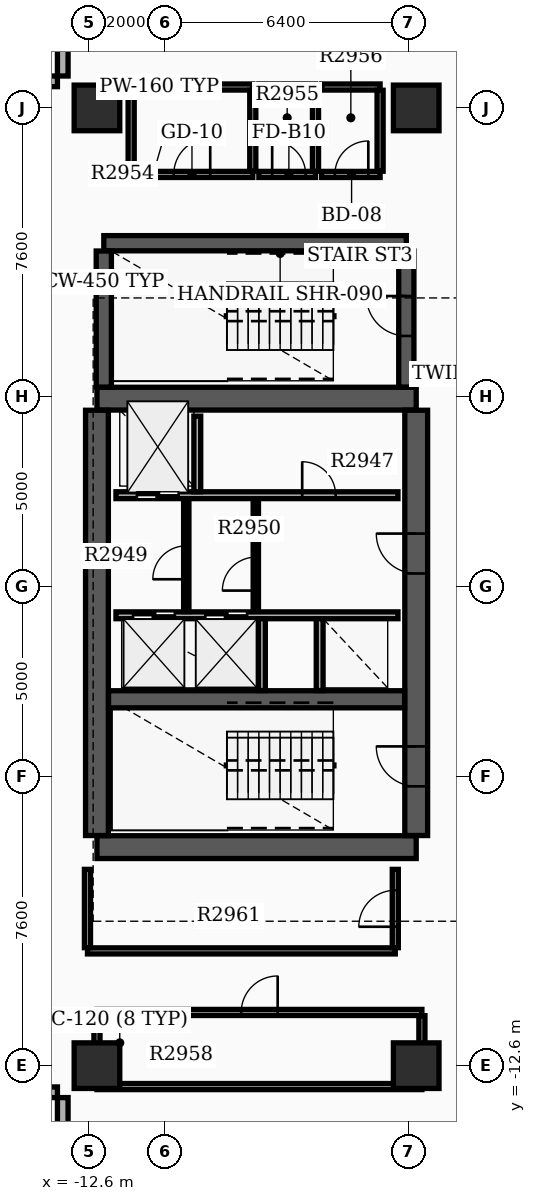
"""IFC4 building model, lengths in metres.
Left out: names, types, materials, properties, quantities, classifications, styles, units other than length and angle.
Written with IfcOpenShell. Run it as: python <this file> out.ifc"""

import sys

from ifc_helpers import new_model, si_unit, direction, frame, frame_2d, origin, origin_2d, place, context, subcontext, project, spatial, rectangle, extrude, element, fill, save


model = new_model("IFC4")
c1 = context("Model", 3, precision=1e-05, world=origin(), true_north=direction((0.0, 1.0)))
c2 = subcontext(c1, "Body", "Model", "MODEL_VIEW")
j1 = project(units=[si_unit("LENGTHUNIT", "METRE"), si_unit("PLANEANGLEUNIT", "RADIAN")], contexts=[c1])
p1 = place(None, origin())
s1 = spatial("IfcSite", under=j1, at=p1, CompositionType="ELEMENT")
p2 = place(p1, origin())
s2 = spatial("IfcBuilding", under=s1, at=p2, CompositionType="ELEMENT")
p3 = place(p2, frame((0.0, 0.0, 183.9)))
s3 = spatial("IfcBuildingStorey", under=s2, at=p3, CompositionType="ELEMENT", Elevation=183.9)
for number, where, z_axis, x_axis in (
    (1, (-12.4, -6.85, 0.0), (0.0, 0.0, 1.0), (1.0, 0.0, 0.0)),
    (2, (-12.4, 4.95, 0.0), (0.0, 0.0, 1.0), (1.0, 0.0, 0.0)),
):
    element("IfcWall", number, at=place(p3, frame(where, z_axis=z_axis, x_axis=x_axis)), inside=s3, PredefinedType="SHEAR", context=c2, shape_type="SweptSolid", body=[
        extrude(rectangle(XDim=8.4, YDim=0.6, at=frame_2d((4.2, 0.0))), origin(), (0.0, 0.0, 1.0), 3.7),
    ])
p4 = place(p3, frame((-12.4, -6.545, 0.0), z_axis=(0.0, 0.0, 1.0), x_axis=(0.0, 1.0, 0.0)))
e3 = element("IfcWall", 3, at=p4, inside=s3, PredefinedType="SHEAR", context=c2, shape_type="SweptSolid", body=[
    extrude(rectangle(XDim=11.19, YDim=0.6, at=frame_2d((5.595, 0.0))), origin(), (0.0, 0.0, 1.0), 3.7),
])
p5 = place(p3, frame((-4.0, -6.545, 0.0), z_axis=(0.0, 0.0, 1.0), x_axis=(0.0, 1.0, 0.0)))
e4 = element("IfcWall", 4, at=p5, inside=s3, PredefinedType="SHEAR", context=c2, shape_type="SweptSolid", body=[
    extrude(rectangle(XDim=11.19, YDim=0.6, at=frame_2d((5.595, 0.0))), origin(), (0.0, 0.0, 1.0), 3.7),
])
p6 = place(p5, frame((1.295, 0.0, 0.0)))
e5 = element("IfcOpeningElement", 5, at=p6, cuts=e4, PredefinedType="OPENING", context=c2, shape_type="SweptSolid", body=[
    extrude(rectangle(XDim=1.05, YDim=2.15, at=frame_2d((0.525, 1.075))), frame((0.0, 0.31, 0.0), z_axis=(0.0, -1.0, 0.0), x_axis=(1.0, 0.0, 0.0)), (0.0, 0.0, 1.0), 0.62),
])
p7 = place(p5, frame((6.895, 0.0, 0.0)))
e6 = element("IfcOpeningElement", 6, at=p7, cuts=e4, PredefinedType="OPENING", context=c2, shape_type="SweptSolid", body=[
    extrude(rectangle(XDim=1.05, YDim=2.15, at=frame_2d((0.525, 1.075))), frame((0.0, 0.31, 0.0), z_axis=(0.0, -1.0, 0.0), x_axis=(1.0, 0.0, 0.0)), (0.0, 0.0, 1.0), 0.62),
])
p8 = place(p3, frame((-12.095, -2.96, 0.0), z_axis=(0.0, 0.0, 1.0), x_axis=(1.0, 0.0, 0.0)))
e7 = element("IfcWall", 7, at=p8, inside=s3, PredefinedType="SHEAR", context=c2, shape_type="SweptSolid", body=[
    extrude(rectangle(XDim=7.79, YDim=0.45, at=frame_2d((3.895, 0.0))), origin(), (0.0, 0.0, 1.0), 3.7),
])
p9 = place(p3, frame((-12.22, 9.04, 0.0), z_axis=(0.0, 0.0, 1.0), x_axis=(1.0, 0.0, 0.0)))
e8 = element("IfcWall", 8, at=p9, inside=s3, PredefinedType="SHEAR", context=c2, shape_type="SweptSolid", body=[
    extrude(rectangle(XDim=7.96, YDim=0.4, at=frame_2d((3.98, 0.0))), origin(), (0.0, 0.0, 1.0), 3.7),
])
p10 = place(p3, frame((-12.22, 5.255, 0.0), z_axis=(0.0, 0.0, 1.0), x_axis=(0.0, 1.0, 0.0)))
e9 = element("IfcWall", 9, at=p10, inside=s3, PredefinedType="SHEAR", context=c2, shape_type="SweptSolid", body=[
    extrude(rectangle(XDim=3.58, YDim=0.4, at=frame_2d((1.79, 0.0))), origin(), (0.0, 0.0, 1.0), 3.7),
])
p11 = place(p3, frame((-4.26, 5.255, 0.0), z_axis=(0.0, 0.0, 1.0), x_axis=(0.0, 1.0, 0.0)))
e10 = element("IfcWall", 10, at=p11, inside=s3, PredefinedType="SHEAR", context=c2, shape_type="SweptSolid", body=[
    extrude(rectangle(XDim=3.58, YDim=0.4, at=frame_2d((1.79, 0.0))), origin(), (0.0, 0.0, 1.0), 3.7),
])
p12 = place(p11, frame((1.345, 0.0, 0.0)))
e11 = element("IfcOpeningElement", 11, at=p12, cuts=e10, PredefinedType="OPENING", context=c2, shape_type="SweptSolid", body=[
    extrude(rectangle(XDim=1.05, YDim=2.15, at=frame_2d((0.525, 1.075))), frame((0.0, 0.21, 0.0), z_axis=(0.0, -1.0, 0.0), x_axis=(1.0, 0.0, 0.0)), (0.0, 0.0, 1.0), 0.42),
])
for number, where, z_axis, x_axis in (
    (12, (-12.4, -12.6, 0.0), (0.0, 0.0, 1.0), (1.0, 0.0, 0.0)),
    (13, (-12.4, 12.6, 0.0), (0.0, 0.0, 1.0), (1.0, 0.0, 0.0)),
    (14, (-4.0, -12.6, 0.0), (0.0, 0.0, 1.0), (1.0, 0.0, 0.0)),
    (15, (-4.0, 12.6, 0.0), (0.0, 0.0, 1.0), (1.0, 0.0, 0.0)),
):
    element("IfcColumn", number, at=place(p3, frame(where, z_axis=z_axis, x_axis=x_axis)), inside=s3, PredefinedType="COLUMN", context=c2, shape_type="SweptSolid", body=[
        extrude(rectangle(XDim=1.2, YDim=1.2, at=origin_2d()), origin(), (0.0, 0.0, 1.0), 3.9),
    ])
p13 = place(p3, frame((-14.66, 13.3, 0.0), z_axis=(0.0, 0.0, 1.0), x_axis=(1.0, 0.0, 0.0)))
e16 = element("IfcWall", 16, at=p13, inside=s3, PredefinedType="STANDARD", context=c2, shape_type="SweptSolid", body=[
    extrude(rectangle(XDim=1.22, YDim=0.28, at=frame_2d((0.61, 0.0))), origin(), (0.0, 0.0, 1.0), 2.97),
])
p14 = place(p3, frame((-13.3, 13.44, 0.0), z_axis=(0.0, 0.0, 1.0), x_axis=(0.0, 1.0, 0.0)))
e17 = element("IfcWall", 17, at=p14, inside=s3, PredefinedType="STANDARD", context=c2, shape_type="SweptSolid", body=[
    extrude(rectangle(XDim=1.5, YDim=0.28, at=frame_2d((0.75, 0.0))), origin(), (0.0, 0.0, 1.0), 2.97),
])
p15 = place(p3, frame((-14.66, -13.3, 0.0), z_axis=(0.0, 0.0, 1.0), x_axis=(1.0, 0.0, 0.0)))
e18 = element("IfcWall", 18, at=p15, inside=s3, PredefinedType="STANDARD", context=c2, shape_type="SweptSolid", body=[
    extrude(rectangle(XDim=1.22, YDim=0.28, at=frame_2d((0.61, 0.0))), origin(), (0.0, 0.0, 1.0), 2.97),
])
p16 = place(p3, frame((-13.3, -13.44, 0.0), z_axis=(0.0, 0.0, 1.0), x_axis=(0.0, -1.0, 0.0)))
e19 = element("IfcWall", 19, at=p16, inside=s3, PredefinedType="STANDARD", context=c2, shape_type="SweptSolid", body=[
    extrude(rectangle(XDim=1.5, YDim=0.28, at=frame_2d((0.75, 0.0))), origin(), (0.0, 0.0, 1.0), 2.97),
])
p17 = place(p3, frame((-11.9, 2.41, 0.0), z_axis=(0.0, 0.0, 1.0), x_axis=(1.0, 0.0, 0.0)))
e20 = element("IfcWall", 20, at=p17, inside=s3, PredefinedType="SOLIDWALL", context=c2, shape_type="SweptSolid", body=[
    extrude(rectangle(XDim=7.42, YDim=0.18, at=frame_2d((3.71, 0.0))), origin(), (0.0, 0.0, 1.0), 2.96),
])
p18 = place(p17, frame((0.55, 0.0, 0.0)))
e21 = element("IfcOpeningElement", 21, at=p18, cuts=e20, PredefinedType="OPENING", context=c2, shape_type="SweptSolid", body=[
    extrude(rectangle(XDim=1.1, YDim=2.15, at=frame_2d((0.55, 1.075))), frame((0.0, 0.1, 0.0), z_axis=(0.0, -1.0, 0.0), x_axis=(1.0, 0.0, 0.0)), (0.0, 0.0, 1.0), 0.2),
])
p19 = place(p17, frame((4.9, 0.0, 0.0)))
e22 = element("IfcOpeningElement", 22, at=p19, cuts=e20, PredefinedType="OPENING", context=c2, shape_type="SweptSolid", body=[
    extrude(rectangle(XDim=0.88, YDim=2.1, at=frame_2d((0.44, 1.05))), frame((0.0, 0.1, 0.0), z_axis=(0.0, -1.0, 0.0), x_axis=(1.0, 0.0, 0.0)), (0.0, 0.0, 1.0), 0.2),
])
p20 = place(p3, frame((-11.9, -0.75, 0.0), z_axis=(0.0, 0.0, 1.0), x_axis=(1.0, 0.0, 0.0)))
e23 = element("IfcWall", 23, at=p20, inside=s3, PredefinedType="SOLIDWALL", context=c2, shape_type="SweptSolid", body=[
    extrude(rectangle(XDim=7.42, YDim=0.18, at=frame_2d((3.71, 0.0))), origin(), (0.0, 0.0, 1.0), 2.96),
])
p21 = place(p20, frame((0.45, 0.0, 0.0)))
e24 = element("IfcOpeningElement", 24, at=p21, cuts=e23, PredefinedType="OPENING", context=c2, shape_type="SweptSolid", body=[
    extrude(rectangle(XDim=1.1, YDim=2.15, at=frame_2d((0.55, 1.075))), frame((0.0, 0.1, 0.0), z_axis=(0.0, -1.0, 0.0), x_axis=(1.0, 0.0, 0.0)), (0.0, 0.0, 1.0), 0.2),
])
p22 = place(p20, frame((2.35, 0.0, 0.0)))
e25 = element("IfcOpeningElement", 25, at=p22, cuts=e23, PredefinedType="OPENING", context=c2, shape_type="SweptSolid", body=[
    extrude(rectangle(XDim=1.1, YDim=2.15, at=frame_2d((0.55, 1.075))), frame((0.0, 0.1, 0.0), z_axis=(0.0, -1.0, 0.0), x_axis=(1.0, 0.0, 0.0)), (0.0, 0.0, 1.0), 0.2),
])
p23 = place(p3, frame((-9.76, 2.5, 0.0), z_axis=(0.0, 0.0, 1.0), x_axis=(0.0, 1.0, 0.0)))
e26 = element("IfcWall", 26, at=p23, inside=s3, PredefinedType="SOLIDWALL", context=c2, shape_type="SweptSolid", body=[
    extrude(rectangle(XDim=1.99, YDim=0.18, at=frame_2d((0.995, 0.0))), origin(), (0.0, 0.0, 1.0), 2.96),
])
for number, where, z_axis, x_axis in (
    (27, (-8.06, -2.73, 0.0), (0.0, 0.0, 1.0), (0.0, 1.0, 0.0)),
    (28, (-6.54, -2.73, 0.0), (0.0, 0.0, 1.0), (0.0, 1.0, 0.0)),
):
    element("IfcWall", number, at=place(p3, frame(where, z_axis=z_axis, x_axis=x_axis)), inside=s3, PredefinedType="SOLIDWALL", context=c2, shape_type="SweptSolid", body=[
        extrude(rectangle(XDim=1.89, YDim=0.18, at=frame_2d((0.945, 0.0))), origin(), (0.0, 0.0, 1.0), 2.96),
    ])
p24 = place(p3, frame((-8.22, -0.65, 0.0), z_axis=(0.0, 0.0, 1.0), x_axis=(0.0, 1.0, 0.0)))
e29 = element("IfcWall", 29, at=p24, inside=s3, PredefinedType="SOLIDWALL", context=c2, shape_type="SweptSolid", body=[
    extrude(rectangle(XDim=2.96, YDim=0.14, at=frame_2d((1.48, 0.0))), origin(), (0.0, 0.0, 1.0), 2.96),
])
p25 = place(p24, frame((0.55, 0.0, 0.0)))
e30 = element("IfcOpeningElement", 30, at=p25, cuts=e29, PredefinedType="OPENING", context=c2, shape_type="SweptSolid", body=[
    extrude(rectangle(XDim=0.88, YDim=2.1, at=frame_2d((0.44, 1.05))), frame((0.0, 0.08, 0.0), z_axis=(0.0, -1.0, 0.0), x_axis=(1.0, 0.0, 0.0)), (0.0, 0.0, 1.0), 0.16),
])
p26 = place(p3, frame((-10.05, -0.652, 0.0), z_axis=(0.0, 0.0, 1.0), x_axis=(0.0, 1.0, 0.0)))
e31 = element("IfcWall", 31, at=p26, inside=s3, PredefinedType="PARTITIONING", context=c2, shape_type="SweptSolid", body=[
    extrude(rectangle(XDim=2.962, YDim=0.14, at=frame_2d((1.481, 0.0))), origin(), (0.0, 0.0, 1.0), 2.96),
])
p27 = place(p26, frame((0.85, 0.0, 0.0)))
e32 = element("IfcOpeningElement", 32, at=p27, cuts=e31, PredefinedType="OPENING", context=c2, shape_type="SweptSolid", body=[
    extrude(rectangle(XDim=0.88, YDim=2.1, at=frame_2d((0.44, 1.05))), frame((0.0, 0.08, 0.0), z_axis=(0.0, -1.0, 0.0), x_axis=(1.0, 0.0, 0.0)), (0.0, 0.0, 1.0), 0.16),
])
p28 = place(p3, frame((-11.5, 10.85, 0.0), z_axis=(0.0, 0.0, 1.0), x_axis=(1.0, 0.0, 0.0)))
e33 = element("IfcWall", 33, at=p28, inside=s3, PredefinedType="PARTITIONING", context=c2, shape_type="SweptSolid", body=[
    extrude(rectangle(XDim=3.2, YDim=0.16, at=frame_2d((1.6, 0.0))), origin(), (0.0, 0.0, 1.0), 2.96),
])
p29 = place(p28, frame((1.12, 0.0, 0.0)))
e34 = element("IfcOpeningElement", 34, at=p29, cuts=e33, PredefinedType="OPENING", context=c2, shape_type="SweptSolid", body=[
    extrude(rectangle(XDim=0.96, YDim=2.15, at=frame_2d((0.48, 1.075))), frame((0.0, 0.09, 0.0), z_axis=(0.0, -1.0, 0.0), x_axis=(1.0, 0.0, 0.0)), (0.0, 0.0, 1.0), 0.18),
])
p30 = place(p3, frame((-11.5, 13.15, 0.0), z_axis=(0.0, 0.0, 1.0), x_axis=(1.0, 0.0, 0.0)))
e35 = element("IfcWall", 35, at=p30, inside=s3, PredefinedType="PARTITIONING", context=c2, shape_type="SweptSolid", body=[
    extrude(rectangle(XDim=3.2, YDim=0.16, at=frame_2d((1.6, 0.0))), origin(), (0.0, 0.0, 1.0), 2.96),
])
for number, where, z_axis, x_axis in (
    (36, (-11.5, 10.935, 0.0), (0.0, 0.0, 1.0), (0.0, 1.0, 0.0)),
    (37, (-8.3, 10.935, 0.0), (0.0, 0.0, 1.0), (0.0, 1.0, 0.0)),
):
    element("IfcWall", number, at=place(p3, frame(where, z_axis=z_axis, x_axis=x_axis)), inside=s3, PredefinedType="PARTITIONING", context=c2, shape_type="SweptSolid", body=[
        extrude(rectangle(XDim=2.13, YDim=0.16, at=frame_2d((1.065, 0.0))), origin(), (0.0, 0.0, 1.0), 2.96),
    ])
p31 = place(p3, frame((-8.14, 10.85, 0.0), z_axis=(0.0, 0.0, 1.0), x_axis=(1.0, 0.0, 0.0)))
e38 = element("IfcWall", 38, at=p31, inside=s3, PredefinedType="PARTITIONING", context=c2, shape_type="SweptSolid", body=[
    extrude(rectangle(XDim=1.49, YDim=0.16, at=frame_2d((0.745, 0.0))), origin(), (0.0, 0.0, 1.0), 2.96),
])
p32 = place(p31, frame((0.35, 0.0, 0.0)))
e39 = element("IfcOpeningElement", 39, at=p32, cuts=e38, PredefinedType="OPENING", context=c2, shape_type="SweptSolid", body=[
    extrude(rectangle(XDim=0.88, YDim=2.1, at=frame_2d((0.44, 1.05))), frame((0.0, 0.09, 0.0), z_axis=(0.0, -1.0, 0.0), x_axis=(1.0, 0.0, 0.0)), (0.0, 0.0, 1.0), 0.18),
])
p33 = place(p3, frame((-8.14, 13.15, 0.0), z_axis=(0.0, 0.0, 1.0), x_axis=(1.0, 0.0, 0.0)))
e40 = element("IfcWall", 40, at=p33, inside=s3, PredefinedType="PARTITIONING", context=c2, shape_type="SweptSolid", body=[
    extrude(rectangle(XDim=1.49, YDim=0.16, at=frame_2d((0.745, 0.0))), origin(), (0.0, 0.0, 1.0), 2.96),
])
p34 = place(p3, frame((-6.65, 10.935, 0.0), z_axis=(0.0, 0.0, 1.0), x_axis=(0.0, 1.0, 0.0)))
e41 = element("IfcWall", 41, at=p34, inside=s3, PredefinedType="PARTITIONING", context=c2, shape_type="SweptSolid", body=[
    extrude(rectangle(XDim=2.13, YDim=0.16, at=frame_2d((1.065, 0.0))), origin(), (0.0, 0.0, 1.0), 2.96),
])
p35 = place(p3, frame((-6.49, 10.85, 0.0), z_axis=(0.0, 0.0, 1.0), x_axis=(1.0, 0.0, 0.0)))
e42 = element("IfcWall", 42, at=p35, inside=s3, PredefinedType="PARTITIONING", context=c2, shape_type="SweptSolid", body=[
    extrude(rectangle(XDim=1.54, YDim=0.16, at=frame_2d((0.77, 0.0))), origin(), (0.0, 0.0, 1.0), 2.96),
])
p36 = place(p35, frame((0.35, 0.0, 0.0)))
e43 = element("IfcOpeningElement", 43, at=p36, cuts=e42, PredefinedType="OPENING", context=c2, shape_type="SweptSolid", body=[
    extrude(rectangle(XDim=0.88, YDim=2.15, at=frame_2d((0.44, 1.075))), frame((0.0, 0.09, 0.0), z_axis=(0.0, -1.0, 0.0), x_axis=(1.0, 0.0, 0.0)), (0.0, 0.0, 1.0), 0.18),
])
p37 = place(p3, frame((-6.49, 13.15, 0.0), z_axis=(0.0, 0.0, 1.0), x_axis=(1.0, 0.0, 0.0)))
e44 = element("IfcWall", 44, at=p37, inside=s3, PredefinedType="PARTITIONING", context=c2, shape_type="SweptSolid", body=[
    extrude(rectangle(XDim=1.54, YDim=0.16, at=frame_2d((0.77, 0.0))), origin(), (0.0, 0.0, 1.0), 2.96),
])
p38 = place(p3, frame((-4.95, 10.935, 0.0), z_axis=(0.0, 0.0, 1.0), x_axis=(0.0, 1.0, 0.0)))
e45 = element("IfcWall", 45, at=p38, inside=s3, PredefinedType="PARTITIONING", context=c2, shape_type="SweptSolid", body=[
    extrude(rectangle(XDim=2.13, YDim=0.16, at=frame_2d((1.065, 0.0))), origin(), (0.0, 0.0, 1.0), 2.96),
])
p39 = place(p3, frame((-12.4, -13.15, 0.0), z_axis=(0.0, 0.0, 1.0), x_axis=(1.0, 0.0, 0.0)))
e46 = element("IfcWall", 46, at=p39, inside=s3, PredefinedType="PARTITIONING", context=c2, shape_type="SweptSolid", body=[
    extrude(rectangle(XDim=8.55, YDim=0.16, at=frame_2d((4.275, 0.0))), origin(), (0.0, 0.0, 1.0), 2.96),
])
p40 = place(p3, frame((-12.4, -11.2, 0.0), z_axis=(0.0, 0.0, 1.0), x_axis=(1.0, 0.0, 0.0)))
e47 = element("IfcWall", 47, at=p40, inside=s3, PredefinedType="PARTITIONING", context=c2, shape_type="SweptSolid", body=[
    extrude(rectangle(XDim=8.55, YDim=0.16, at=frame_2d((4.275, 0.0))), origin(), (0.0, 0.0, 1.0), 2.96),
])
p41 = place(p40, frame((3.795, 0.0, 0.0)))
e48 = element("IfcOpeningElement", 48, at=p41, cuts=e47, PredefinedType="OPENING", context=c2, shape_type="SweptSolid", body=[
    extrude(rectangle(XDim=0.96, YDim=2.15, at=frame_2d((0.48, 1.075))), frame((0.0, 0.09, 0.0), z_axis=(0.0, -1.0, 0.0), x_axis=(1.0, 0.0, 0.0)), (0.0, 0.0, 1.0), 0.18),
])
for number, where, z_axis, x_axis in (
    (49, (-12.4, -13.065, 0.0), (0.0, 0.0, 1.0), (0.0, 1.0, 0.0)),
    (50, (-3.85, -13.065, 0.0), (0.0, 0.0, 1.0), (0.0, 1.0, 0.0)),
):
    element("IfcWall", number, at=place(p3, frame(where, z_axis=z_axis, x_axis=x_axis)), inside=s3, PredefinedType="PARTITIONING", context=c2, shape_type="SweptSolid", body=[
        extrude(rectangle(XDim=1.78, YDim=0.16, at=frame_2d((0.89, 0.0))), origin(), (0.0, 0.0, 1.0), 2.96),
    ])
p42 = place(p3, frame((-12.65, -9.58, 0.0), z_axis=(0.0, 0.0, 1.0), x_axis=(1.0, 0.0, 0.0)))
e51 = element("IfcWall", 51, at=p42, inside=s3, PredefinedType="PARTITIONING", context=c2, shape_type="SweptSolid", body=[
    extrude(rectangle(XDim=8.1, YDim=0.16, at=frame_2d((4.05, 0.0))), origin(), (0.0, 0.0, 1.0), 2.96),
])
p43 = place(p3, frame((-12.65, -9.495, 0.0), z_axis=(0.0, 0.0, 1.0), x_axis=(0.0, 1.0, 0.0)))
e52 = element("IfcWall", 52, at=p43, inside=s3, PredefinedType="PARTITIONING", context=c2, shape_type="SweptSolid", body=[
    extrude(rectangle(XDim=2.06, YDim=0.16, at=frame_2d((1.03, 0.0))), origin(), (0.0, 0.0, 1.0), 2.96),
])
p44 = place(p3, frame((-4.55, -9.495, 0.0), z_axis=(0.0, 0.0, 1.0), x_axis=(0.0, 1.0, 0.0)))
e53 = element("IfcWall", 53, at=p44, inside=s3, PredefinedType="PARTITIONING", context=c2, shape_type="SweptSolid", body=[
    extrude(rectangle(XDim=2.06, YDim=0.16, at=frame_2d((1.03, 0.0))), origin(), (0.0, 0.0, 1.0), 2.96),
])
p45 = place(p44, frame((0.55, 0.0, 0.0)))
e54 = element("IfcOpeningElement", 54, at=p45, cuts=e53, PredefinedType="OPENING", context=c2, shape_type="SweptSolid", body=[
    extrude(rectangle(XDim=0.96, YDim=2.15, at=frame_2d((0.48, 1.075))), frame((0.0, 0.09, 0.0), z_axis=(0.0, -1.0, 0.0), x_axis=(1.0, 0.0, 0.0)), (0.0, 0.0, 1.0), 0.18),
])
p46 = place(p6, origin())
e55 = element("IfcDoor", 55, at=p46, inside=s3, OperationType="SINGLE_SWING_RIGHT", PredefinedType="DOOR", context=c2, shape_type="SweptSolid", body=[
    extrude(rectangle(XDim=1.05, YDim=2.15, at=frame_2d((0.525, 1.075))), frame((0.0, 0.025, 0.0), z_axis=(0.0, -1.0, 0.0), x_axis=(1.0, 0.0, 0.0)), (0.0, 0.0, 1.0), 0.05),
])
fill(e5, e55)
p47 = place(p7, origin())
e56 = element("IfcDoor", 56, at=p47, inside=s3, OperationType="SINGLE_SWING_RIGHT", PredefinedType="DOOR", context=c2, shape_type="SweptSolid", body=[
    extrude(rectangle(XDim=1.05, YDim=2.15, at=frame_2d((0.525, 1.075))), frame((0.0, 0.025, 0.0), z_axis=(0.0, -1.0, 0.0), x_axis=(1.0, 0.0, 0.0)), (0.0, 0.0, 1.0), 0.05),
])
fill(e6, e56)
p48 = place(p12, origin())
e57 = element("IfcDoor", 57, at=p48, inside=s3, OperationType="SINGLE_SWING_RIGHT", PredefinedType="DOOR", context=c2, shape_type="SweptSolid", body=[
    extrude(rectangle(XDim=1.05, YDim=2.15, at=frame_2d((0.525, 1.075))), frame((0.0, 0.025, 0.0), z_axis=(0.0, -1.0, 0.0), x_axis=(1.0, 0.0, 0.0)), (0.0, 0.0, 1.0), 0.05),
])
fill(e11, e57)
p49 = place(p18, origin())
e58 = element("IfcDoor", 58, at=p49, inside=s3, OperationType="DOUBLE_DOOR_SLIDING", PredefinedType="DOOR", context=c2, shape_type="SweptSolid", body=[
    extrude(rectangle(XDim=1.1, YDim=2.15, at=frame_2d((0.55, 1.075))), frame((0.0, 0.025, 0.0), z_axis=(0.0, -1.0, 0.0), x_axis=(1.0, 0.0, 0.0)), (0.0, 0.0, 1.0), 0.05),
])
fill(e21, e58)
p50 = place(p21, origin())
e59 = element("IfcDoor", 59, at=p50, inside=s3, OperationType="DOUBLE_DOOR_SLIDING", PredefinedType="DOOR", context=c2, shape_type="SweptSolid", body=[
    extrude(rectangle(XDim=1.1, YDim=2.15, at=frame_2d((0.55, 1.075))), frame((0.0, 0.025, 0.0), z_axis=(0.0, -1.0, 0.0), x_axis=(1.0, 0.0, 0.0)), (0.0, 0.0, 1.0), 0.05),
])
fill(e24, e59)
p51 = place(p22, origin())
e60 = element("IfcDoor", 60, at=p51, inside=s3, OperationType="DOUBLE_DOOR_SLIDING", PredefinedType="DOOR", context=c2, shape_type="SweptSolid", body=[
    extrude(rectangle(XDim=1.1, YDim=2.15, at=frame_2d((0.55, 1.075))), frame((0.0, 0.025, 0.0), z_axis=(0.0, -1.0, 0.0), x_axis=(1.0, 0.0, 0.0)), (0.0, 0.0, 1.0), 0.05),
])
fill(e25, e60)
p52 = place(p19, origin())
e61 = element("IfcDoor", 61, at=p52, inside=s3, OperationType="SINGLE_SWING_LEFT", PredefinedType="DOOR", context=c2, shape_type="SweptSolid", body=[
    extrude(rectangle(XDim=0.88, YDim=2.1, at=frame_2d((0.44, 1.05))), frame((0.0, 0.025, 0.0), z_axis=(0.0, -1.0, 0.0), x_axis=(1.0, 0.0, 0.0)), (0.0, 0.0, 1.0), 0.05),
])
fill(e22, e61)
p53 = place(p25, origin())
e62 = element("IfcDoor", 62, at=p53, inside=s3, OperationType="SINGLE_SWING_LEFT", PredefinedType="DOOR", context=c2, shape_type="SweptSolid", body=[
    extrude(rectangle(XDim=0.88, YDim=2.1, at=frame_2d((0.44, 1.05))), frame((0.0, 0.025, 0.0), z_axis=(0.0, -1.0, 0.0), x_axis=(1.0, 0.0, 0.0)), (0.0, 0.0, 1.0), 0.05),
])
fill(e30, e62)
p54 = place(p27, origin())
e63 = element("IfcDoor", 63, at=p54, inside=s3, OperationType="SINGLE_SWING_LEFT", PredefinedType="DOOR", context=c2, shape_type="SweptSolid", body=[
    extrude(rectangle(XDim=0.88, YDim=2.1, at=frame_2d((0.44, 1.05))), frame((0.0, 0.025, 0.0), z_axis=(0.0, -1.0, 0.0), x_axis=(1.0, 0.0, 0.0)), (0.0, 0.0, 1.0), 0.05),
])
fill(e32, e63)
p55 = place(p29, origin())
e64 = element("IfcDoor", 64, at=p55, inside=s3, OperationType="SINGLE_SWING_RIGHT", PredefinedType="DOOR", context=c2, shape_type="SweptSolid", body=[
    extrude(rectangle(XDim=0.96, YDim=2.15, at=frame_2d((0.48, 1.075))), frame((0.0, 0.025, 0.0), z_axis=(0.0, -1.0, 0.0), x_axis=(1.0, 0.0, 0.0)), (0.0, 0.0, 1.0), 0.05),
])
fill(e34, e64)
p56 = place(p32, origin())
e65 = element("IfcDoor", 65, at=p56, inside=s3, OperationType="SINGLE_SWING_LEFT", PredefinedType="DOOR", context=c2, shape_type="SweptSolid", body=[
    extrude(rectangle(XDim=0.88, YDim=2.1, at=frame_2d((0.44, 1.05))), frame((0.0, 0.025, 0.0), z_axis=(0.0, -1.0, 0.0), x_axis=(1.0, 0.0, 0.0)), (0.0, 0.0, 1.0), 0.05),
])
fill(e39, e65)
p57 = place(p36, origin())
e66 = element("IfcDoor", 66, at=p57, inside=s3, OperationType="SINGLE_SWING_RIGHT", PredefinedType="DOOR", context=c2, shape_type="SweptSolid", body=[
    extrude(rectangle(XDim=0.88, YDim=2.15, at=frame_2d((0.44, 1.075))), frame((0.0, 0.025, 0.0), z_axis=(0.0, -1.0, 0.0), x_axis=(1.0, 0.0, 0.0)), (0.0, 0.0, 1.0), 0.05),
])
fill(e43, e66)
p58 = place(p41, origin())
e67 = element("IfcDoor", 67, at=p58, inside=s3, OperationType="SINGLE_SWING_RIGHT", PredefinedType="DOOR", context=c2, shape_type="SweptSolid", body=[
    extrude(rectangle(XDim=0.96, YDim=2.15, at=frame_2d((0.48, 1.075))), frame((0.0, 0.025, 0.0), z_axis=(0.0, -1.0, 0.0), x_axis=(1.0, 0.0, 0.0)), (0.0, 0.0, 1.0), 0.05),
])
fill(e48, e67)
p59 = place(p45, origin())
e68 = element("IfcDoor", 68, at=p59, inside=s3, OperationType="SINGLE_SWING_LEFT", PredefinedType="DOOR", context=c2, shape_type="SweptSolid", body=[
    extrude(rectangle(XDim=0.96, YDim=2.15, at=frame_2d((0.48, 1.075))), frame((0.0, 0.025, 0.0), z_axis=(0.0, -1.0, 0.0), x_axis=(1.0, 0.0, 0.0)), (0.0, 0.0, 1.0), 0.05),
])
fill(e54, e68)
save(model, sys.argv[1])
